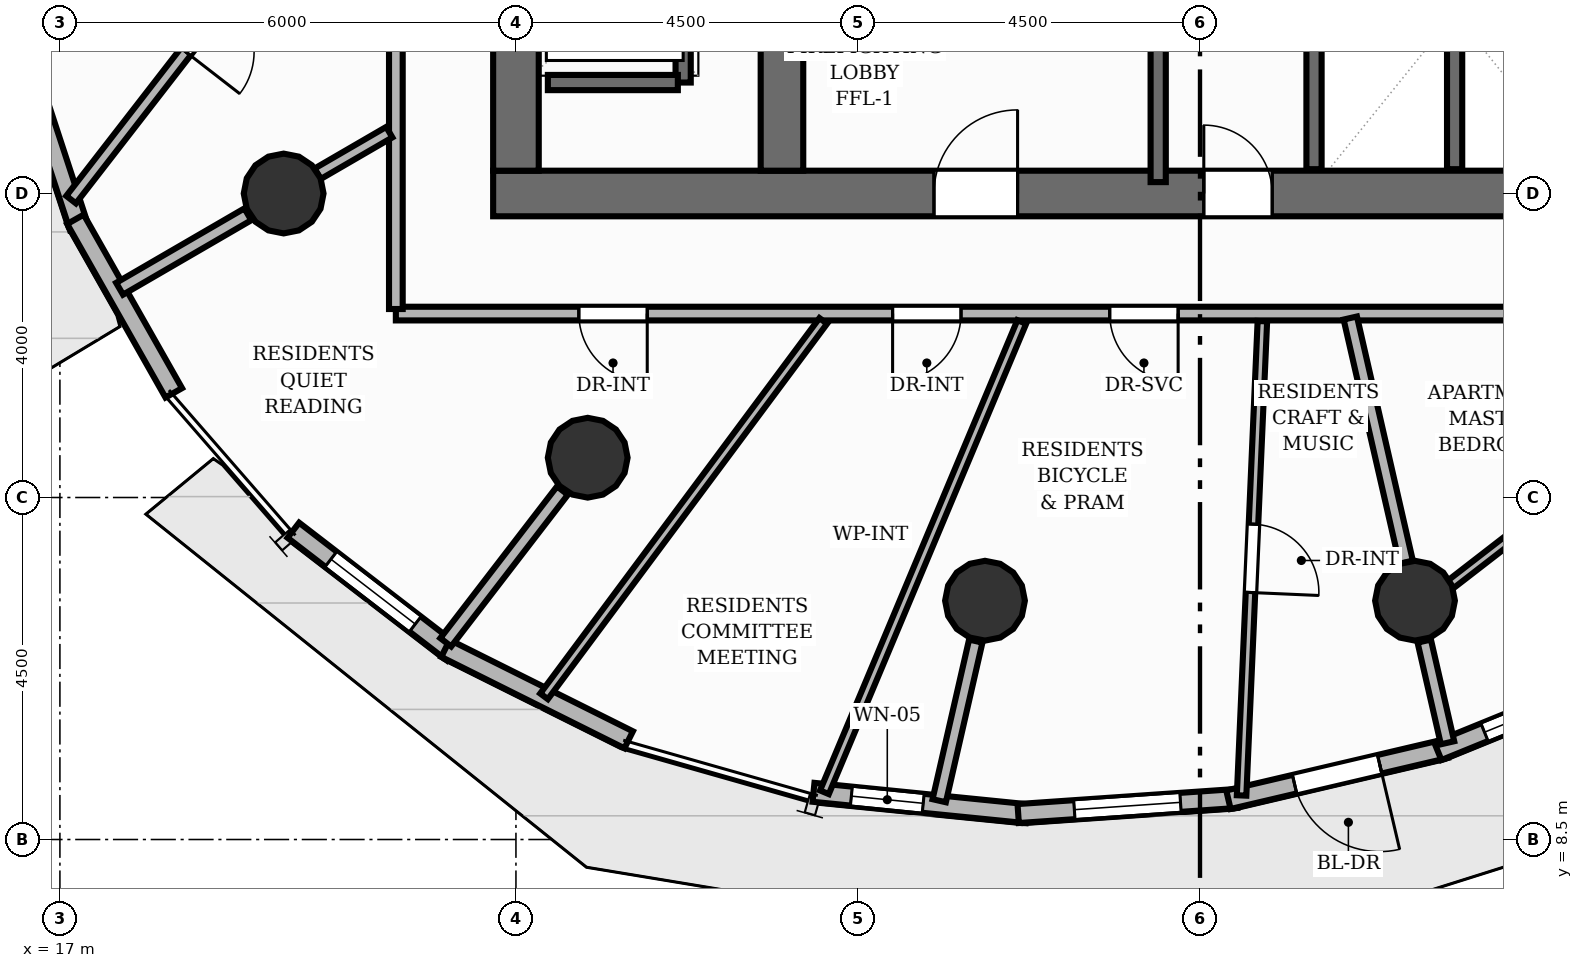
"""IFC4 building model, lengths in metres.
Left out: names, types, materials, properties, quantities, classifications, styles, units other than length and angle.
Written with IfcOpenShell. Run it as: python <this file> out.ifc"""

import sys

from ifc_helpers import new_model, si_unit, direction, frame, frame_2d, origin, origin_2d, place, context, subcontext, project, spatial, rectangle, circle, extrude, element, fill, save


model = new_model("IFC4")
c1 = context("Model", 3, precision=1e-05, world=origin(), true_north=direction((0.0, 1.0)))
c2 = subcontext(c1, "Body", "Model", "MODEL_VIEW")
j1 = project(units=[si_unit("LENGTHUNIT", "METRE"), si_unit("PLANEANGLEUNIT", "RADIAN")], contexts=[c1])
p1 = place(None, origin())
s1 = spatial("IfcSite", under=j1, at=p1, CompositionType="ELEMENT")
p2 = place(p1, origin())
s2 = spatial("IfcBuilding", under=s1, at=p2, CompositionType="ELEMENT")
p3 = place(p2, frame((0.0, 0.0, 142.56)))
s3 = spatial("IfcBuildingStorey", under=s2, at=p3, CompositionType="ELEMENT", Elevation=142.56)
p4 = place(p3, frame((22.7, 17.0, 0.0), z_axis=(0.0, 0.0, 1.0), x_axis=(1.0, 0.0, 0.0)))
e1 = element("IfcWall", 1, at=p4, inside=s3, PredefinedType="SHEAR", context=c2, shape_type="SweptSolid", body=[
    extrude(rectangle(XDim=15.1, YDim=0.6, at=frame_2d((7.55, 0.0))), origin(), (0.0, 0.0, 1.0), 3.2),
])
p5 = place(p4, frame((5.8, 0.0, 0.0)))
e2 = element("IfcOpeningElement", 2, at=p5, cuts=e1, PredefinedType="OPENING", context=c2, shape_type="SweptSolid", body=[
    extrude(rectangle(XDim=1.1, YDim=2.15, at=frame_2d((0.55, 1.075))), frame((0.0, 0.31, 0.0), z_axis=(0.0, -1.0, 0.0), x_axis=(1.0, 0.0, 0.0)), (0.0, 0.0, 1.0), 0.62),
])
p6 = place(p4, frame((9.35, 0.0, 0.0)))
e3 = element("IfcOpeningElement", 3, at=p6, cuts=e1, PredefinedType="OPENING", context=c2, shape_type="SweptSolid", body=[
    extrude(rectangle(XDim=0.9, YDim=2.1, at=frame_2d((0.45, 1.05))), frame((0.0, 0.31, 0.0), z_axis=(0.0, -1.0, 0.0), x_axis=(1.0, 0.0, 0.0)), (0.0, 0.0, 1.0), 0.62),
])
p7 = place(p3, frame((23.0, 17.3, 0.0), z_axis=(0.0, 0.0, 1.0), x_axis=(0.0, 1.0, 0.0)))
e4 = element("IfcWall", 4, at=p7, inside=s3, PredefinedType="SHEAR", context=c2, shape_type="SweptSolid", body=[
    extrude(rectangle(XDim=13.4, YDim=0.6, at=frame_2d((6.7, 0.0))), origin(), (0.0, 0.0, 1.0), 3.2),
])
p8 = place(p7, frame((1.675, 0.0, 0.0)))
e5 = element("IfcOpeningElement", 5, at=p8, cuts=e4, PredefinedType="OPENING", context=c2, shape_type="SweptSolid", body=[
    extrude(rectangle(XDim=1.05, YDim=2.15, at=frame_2d((0.525, 1.075))), frame((0.0, 0.31, 0.0), z_axis=(0.0, -1.0, 0.0), x_axis=(1.0, 0.0, 0.0)), (0.0, 0.0, 1.0), 0.62),
])
p9 = place(p7, frame((6.175, 0.0, 0.0)))
e6 = element("IfcOpeningElement", 6, at=p9, cuts=e4, PredefinedType="OPENING", context=c2, shape_type="SweptSolid", body=[
    extrude(rectangle(XDim=1.05, YDim=2.15, at=frame_2d((0.525, 1.075))), frame((0.0, 0.31, 0.0), z_axis=(0.0, -1.0, 0.0), x_axis=(1.0, 0.0, 0.0)), (0.0, 0.0, 1.0), 0.62),
])
p10 = place(p7, frame((10.675, 0.0, 0.0)))
e7 = element("IfcOpeningElement", 7, at=p10, cuts=e4, PredefinedType="OPENING", context=c2, shape_type="SweptSolid", body=[
    extrude(rectangle(XDim=1.05, YDim=2.15, at=frame_2d((0.525, 1.075))), frame((0.0, 0.31, 0.0), z_axis=(0.0, -1.0, 0.0), x_axis=(1.0, 0.0, 0.0)), (0.0, 0.0, 1.0), 0.62),
])
p11 = place(p3, frame((26.5, 17.3, 0.0), z_axis=(0.0, 0.0, 1.0), x_axis=(0.0, 1.0, 0.0)))
e8 = element("IfcWall", 8, at=p11, inside=s3, PredefinedType="SHEAR", context=c2, shape_type="SweptSolid", body=[
    extrude(rectangle(XDim=13.4, YDim=0.56, at=frame_2d((6.7, 0.0))), origin(), (0.0, 0.0, 1.0), 3.2),
])
for number, where, z_axis, x_axis in (
    (9, (19.944, 17.0, 0.0), (0.0, 0.0, 1.0), (1.0, 0.0, 0.0)),
    (10, (23.944, 13.523, 0.0), (0.0, 0.0, 1.0), (1.0, 0.0, 0.0)),
    (11, (29.171, 11.642, 0.0), (0.0, 0.0, 1.0), (1.0, 0.0, 0.0)),
    (12, (34.829, 11.642, 0.0), (0.0, 0.0, 1.0), (1.0, 0.0, 0.0)),
):
    element("IfcColumn", number, at=place(p3, frame(where, z_axis=z_axis, x_axis=x_axis)), inside=s3, PredefinedType="COLUMN", context=c2, shape_type="SweptSolid", body=[
        extrude(circle(Radius=0.525, at=origin_2d()), origin(), (0.0, 0.0, 1.0), 3.2),
    ])
p12 = place(p3, frame((17.251, 16.556, 0.0), z_axis=(0.0, 0.0, 1.0), x_axis=(-0.311522010952, 0.950238936633, 0.0)))
e13 = element("IfcWall", 13, at=p12, inside=s3, PredefinedType="SOLIDWALL", context=c2, shape_type="SweptSolid", body=[
    extrude(rectangle(XDim=2.648, YDim=0.25, at=frame_2d((1.324, 0.0))), origin(), (0.0, 0.0, 1.0), 2.96),
])
p13 = place(p3, frame((18.498, 14.377, 0.0), z_axis=(0.0, 0.0, 1.0), x_axis=(-0.492909281161, 0.870080709214, 0.0)))
e14 = element("IfcWall", 14, at=p13, inside=s3, PredefinedType="SOLIDWALL", context=c2, shape_type="SweptSolid", body=[
    extrude(rectangle(XDim=2.624, YDim=0.25, at=frame_2d((1.312, 0.0))), origin(), (0.0, 0.0, 1.0), 2.96),
])
p14 = place(p3, frame((22.169, 10.954, 0.0), z_axis=(0.0, 0.0, 1.0), x_axis=(-0.7923805969, 0.610027040103, 0.0)))
e15 = element("IfcWall", 15, at=p14, inside=s3, PredefinedType="SOLIDWALL", context=c2, shape_type="SweptSolid", body=[
    extrude(rectangle(XDim=2.648, YDim=0.25, at=frame_2d((1.324, 0.0))), origin(), (0.0, 0.0, 1.0), 2.96),
])
p15 = place(p14, frame((0.624, 0.0, 0.85)))
e16 = element("IfcOpeningElement", 16, at=p15, cuts=e15, PredefinedType="OPENING", context=c2, shape_type="SweptSolid", body=[
    extrude(rectangle(XDim=1.4, YDim=1.55, at=frame_2d((0.7, 0.775))), frame((0.0, 0.135, 0.0), z_axis=(0.0, -1.0, 0.0), x_axis=(1.0, 0.0, 0.0)), (0.0, 0.0, 1.0), 0.27),
])
p16 = place(p3, frame((24.483, 9.812, 0.0), z_axis=(0.0, 0.0, 1.0), x_axis=(-0.894843809708, 0.446379385979, 0.0)))
e17 = element("IfcWall", 17, at=p16, inside=s3, PredefinedType="SOLIDWALL", context=c2, shape_type="SweptSolid", body=[
    extrude(rectangle(XDim=2.693, YDim=0.25, at=frame_2d((1.347, 0.0))), origin(), (0.0, 0.0, 1.0), 2.96),
])
p17 = place(p3, frame((29.719, 8.84, 0.0), z_axis=(0.0, 0.0, 1.0), x_axis=(-0.995013999105, 0.099735357744, 0.0)))
e18 = element("IfcWall", 18, at=p17, inside=s3, PredefinedType="SOLIDWALL", context=c2, shape_type="SweptSolid", body=[
    extrude(rectangle(XDim=2.818, YDim=0.25, at=frame_2d((1.409, 0.0))), origin(), (0.0, 0.0, 1.0), 2.96),
])
p18 = place(p17, frame((1.367, 0.0, 0.85)))
e19 = element("IfcOpeningElement", 19, at=p18, cuts=e18, PredefinedType="OPENING", context=c2, shape_type="SweptSolid", body=[
    extrude(rectangle(XDim=0.95, YDim=1.45, at=frame_2d((0.475, 0.725))), frame((0.0, 0.135, 0.0), z_axis=(0.0, -1.0, 0.0), x_axis=(1.0, 0.0, 0.0)), (0.0, 0.0, 1.0), 0.27),
])
p19 = place(p3, frame((32.483, 9.04, 0.0), z_axis=(0.0, 0.0, 1.0), x_axis=(-0.997630729469, -0.068796276206, 0.0)))
e20 = element("IfcWall", 20, at=p19, inside=s3, PredefinedType="SOLIDWALL", context=c2, shape_type="SweptSolid", body=[
    extrude(rectangle(XDim=2.882, YDim=0.25, at=frame_2d((1.441, 0.0))), origin(), (0.0, 0.0, 1.0), 2.96),
])
p20 = place(p19, frame((0.741, 0.0, 0.85)))
e21 = element("IfcOpeningElement", 21, at=p20, cuts=e20, PredefinedType="OPENING", context=c2, shape_type="SweptSolid", body=[
    extrude(rectangle(XDim=1.4, YDim=1.55, at=frame_2d((0.7, 0.775))), frame((0.0, 0.135, 0.0), z_axis=(0.0, -1.0, 0.0), x_axis=(1.0, 0.0, 0.0)), (0.0, 0.0, 1.0), 0.27),
])
p21 = place(p3, frame((35.233, 9.695, 0.0), z_axis=(0.0, 0.0, 1.0), x_axis=(-0.973538048261, -0.228524984602, 0.0)))
e22 = element("IfcWall", 22, at=p21, inside=s3, PredefinedType="SOLIDWALL", context=c2, shape_type="SweptSolid", body=[
    extrude(rectangle(XDim=2.937, YDim=0.25, at=frame_2d((1.468, 0.0))), origin(), (0.0, 0.0, 1.0), 2.96),
])
p22 = place(p21, frame((0.893, 0.0, 0.0)))
e23 = element("IfcOpeningElement", 23, at=p22, cuts=e22, PredefinedType="OPENING", context=c2, shape_type="SweptSolid", body=[
    extrude(rectangle(XDim=1.15, YDim=2.2, at=frame_2d((0.575, 1.1))), frame((0.0, 0.135, 0.0), z_axis=(0.0, -1.0, 0.0), x_axis=(1.0, 0.0, 0.0)), (0.0, 0.0, 1.0), 0.27),
])
p23 = place(p3, frame((37.886, 10.785, 0.0), z_axis=(0.0, 0.0, 1.0), x_axis=(-0.926076439021, -0.377335963154, 0.0)))
e24 = element("IfcWall", 24, at=p23, inside=s3, PredefinedType="SOLIDWALL", context=c2, shape_type="SweptSolid", body=[
    extrude(rectangle(XDim=2.977, YDim=0.25, at=frame_2d((1.488, 0.0))), origin(), (0.0, 0.0, 1.0), 2.96),
])
p24 = place(p23, frame((0.664, 0.0, 0.85)))
e25 = element("IfcOpeningElement", 25, at=p24, cuts=e24, PredefinedType="OPENING", context=c2, shape_type="SweptSolid", body=[
    extrude(rectangle(XDim=1.65, YDim=1.55, at=frame_2d((0.825, 0.775))), frame((0.0, 0.135, 0.0), z_axis=(0.0, -1.0, 0.0), x_axis=(1.0, 0.0, 0.0)), (0.0, 0.0, 1.0), 0.27),
])
p25 = place(p3, frame((31.45, 17.15, 0.0), z_axis=(0.0, 0.0, 1.0), x_axis=(0.0, 1.0, 0.0)))
e26 = element("IfcWall", 26, at=p25, inside=s3, PredefinedType="SHEAR", context=c2, shape_type="SweptSolid", body=[
    extrude(rectangle(XDim=3.5, YDim=0.2, at=frame_2d((1.75, 0.0))), origin(), (0.0, 0.0, 1.0), 3.2),
])
p26 = place(p3, frame((25.2, 18.46, 0.0), z_axis=(0.0, 0.0, 1.0), x_axis=(0.0, 1.0, 0.0)))
e27 = element("IfcWall", 27, at=p26, inside=s3, PredefinedType="SHEAR", context=c2, shape_type="SweptSolid", body=[
    extrude(rectangle(XDim=11.08, YDim=0.2, at=frame_2d((5.54, 0.0))), origin(), (0.0, 0.0, 1.0), 3.2),
])
p27 = place(p3, frame((23.42, 18.46, 0.0), z_axis=(0.0, 0.0, 1.0), x_axis=(1.0, 0.0, 0.0)))
e28 = element("IfcWall", 28, at=p27, inside=s3, PredefinedType="SHEAR", context=c2, shape_type="SweptSolid", body=[
    extrude(rectangle(XDim=1.71, YDim=0.2, at=frame_2d((0.855, 0.0))), origin(), (0.0, 0.0, 1.0), 3.2),
])
for number, where, z_axis, x_axis in (
    (29, (33.5, 17.32, 0.0), (0.0, 0.0, 1.0), (0.0, 1.0, 0.0)),
    (30, (35.35, 17.32, 0.0), (0.0, 0.0, 1.0), (0.0, 1.0, 0.0)),
):
    element("IfcWall", number, at=place(p3, frame(where, z_axis=z_axis, x_axis=x_axis)), inside=s3, PredefinedType="SHEAR", context=c2, shape_type="SweptSolid", body=[
        extrude(rectangle(XDim=1.86, YDim=0.2, at=frame_2d((0.93, 0.0))), origin(), (0.0, 0.0, 1.0), 3.2),
    ])
p28 = place(p3, frame((19.472, 16.726, 0.0), z_axis=(0.0, 0.0, 1.0), x_axis=(-0.864802971131, -0.502111363268, 0.0)))
e31 = element("IfcWall", 31, at=p28, inside=s3, PredefinedType="PARTITIONING", context=c2, shape_type="SweptSolid", body=[
    extrude(rectangle(XDim=1.951, YDim=0.18, at=frame_2d((0.975, 0.0))), origin(), (0.0, 0.0, 1.0), 2.336),
])
p29 = place(p3, frame((23.612, 13.092, 0.0), z_axis=(0.0, 0.0, 1.0), x_axis=(-0.609556175004, -0.792742877303, 0.0)))
e32 = element("IfcWall", 32, at=p29, inside=s3, PredefinedType="PARTITIONING", context=c2, shape_type="SweptSolid", body=[
    extrude(rectangle(XDim=2.519, YDim=0.18, at=frame_2d((1.259, 0.0))), origin(), (0.0, 0.0, 1.0), 2.336),
])
p30 = place(p3, frame((29.05, 11.111, 0.0), z_axis=(0.0, 0.0, 1.0), x_axis=(-0.223080127706, -0.974800111111, 0.0)))
e33 = element("IfcWall", 33, at=p30, inside=s3, PredefinedType="PARTITIONING", context=c2, shape_type="SweptSolid", body=[
    extrude(rectangle(XDim=2.155, YDim=0.18, at=frame_2d((1.077, 0.0))), origin(), (0.0, 0.0, 1.0), 2.336),
])
p31 = place(p3, frame((34.95, 11.111, 0.0), z_axis=(0.0, 0.0, 1.0), x_axis=(0.223027623572, -0.974812125039, 0.0)))
e34 = element("IfcWall", 34, at=p31, inside=s3, PredefinedType="PARTITIONING", context=c2, shape_type="SweptSolid", body=[
    extrude(rectangle(XDim=1.373, YDim=0.18, at=frame_2d((0.687, 0.0))), origin(), (0.0, 0.0, 1.0), 2.336),
])
p32 = place(p3, frame((39.08, 15.42, 0.0), z_axis=(0.0, 0.0, 1.0), x_axis=(-1.0, 0.0, 0.0)))
e35 = element("IfcWall", 35, at=p32, inside=s3, PredefinedType="PARTITIONING", context=c2, shape_type="SweptSolid", body=[
    extrude(rectangle(XDim=17.66, YDim=0.18, at=frame_2d((8.83, 0.0))), origin(), (0.0, 0.0, 1.0), 2.955),
])
p33 = place(p32, frame((7.368, 0.0, 0.0)))
e36 = element("IfcOpeningElement", 36, at=p33, cuts=e35, PredefinedType="OPENING", context=c2, shape_type="SweptSolid", body=[
    extrude(rectangle(XDim=0.9, YDim=2.1, at=frame_2d((0.45, 1.05))), frame((0.0, 0.1, 0.0), z_axis=(0.0, -1.0, 0.0), x_axis=(1.0, 0.0, 0.0)), (0.0, 0.0, 1.0), 0.2),
])
p34 = place(p32, frame((10.224, 0.0, 0.0)))
e37 = element("IfcOpeningElement", 37, at=p34, cuts=e35, PredefinedType="OPENING", context=c2, shape_type="SweptSolid", body=[
    extrude(rectangle(XDim=0.9, YDim=2.1, at=frame_2d((0.45, 1.05))), frame((0.0, 0.1, 0.0), z_axis=(0.0, -1.0, 0.0), x_axis=(1.0, 0.0, 0.0)), (0.0, 0.0, 1.0), 0.2),
])
p35 = place(p32, frame((14.353, 0.0, 0.0)))
e38 = element("IfcOpeningElement", 38, at=p35, cuts=e35, PredefinedType="OPENING", context=c2, shape_type="SweptSolid", body=[
    extrude(rectangle(XDim=0.9, YDim=2.1, at=frame_2d((0.45, 1.05))), frame((0.0, 0.1, 0.0), z_axis=(0.0, -1.0, 0.0), x_axis=(1.0, 0.0, 0.0)), (0.0, 0.0, 1.0), 0.2),
])
p36 = place(p3, frame((21.42, 15.48, 0.0), z_axis=(0.0, 0.0, 1.0), x_axis=(0.0, 1.0, 0.0)))
e39 = element("IfcWall", 39, at=p36, inside=s3, PredefinedType="PARTITIONING", context=c2, shape_type="SweptSolid", body=[
    extrude(rectangle(XDim=6.12, YDim=0.18, at=frame_2d((3.06, 0.0))), origin(), (0.0, 0.0, 1.0), 2.955),
])
p37 = place(p3, frame((27.059, 9.122, 0.0), z_axis=(0.0, 0.0, 1.0), x_axis=(0.386926287161, 0.922110648623, 0.0)))
e40 = element("IfcWall", 40, at=p37, inside=s3, PredefinedType="PARTITIONING", context=c2, shape_type="SweptSolid", body=[
    extrude(rectangle(XDim=6.71, YDim=0.125, at=frame_2d((3.355, 0.0))), origin(), (0.0, 0.0, 1.0), 2.955),
])
p38 = place(p3, frame((32.821, 15.32, 0.0), z_axis=(0.0, 0.0, 1.0), x_axis=(-0.043813760095, -0.999039716141, 0.0)))
e41 = element("IfcWall", 41, at=p38, inside=s3, PredefinedType="PARTITIONING", context=c2, shape_type="SweptSolid", body=[
    extrude(rectangle(XDim=6.247, YDim=0.125, at=frame_2d((3.123, 0.0))), origin(), (0.0, 0.0, 1.0), 2.692),
])
p39 = place(p38, frame((2.673, 0.0, 0.0)))
e42 = element("IfcOpeningElement", 42, at=p39, cuts=e41, PredefinedType="OPENING", context=c2, shape_type="SweptSolid", body=[
    extrude(rectangle(XDim=0.9, YDim=2.1, at=frame_2d((0.45, 1.05))), frame((0.0, 0.073, 0.0), z_axis=(0.0, -1.0, 0.0), x_axis=(1.0, 0.0, 0.0)), (0.0, 0.0, 1.0), 0.145),
])
p40 = place(p3, frame((23.37, 10.384, 0.0), z_axis=(0.0, 0.0, 1.0), x_axis=(0.596726995384, 0.802444323913, 0.0)))
e43 = element("IfcWall", 43, at=p40, inside=s3, PredefinedType="PARTITIONING", context=c2, shape_type="SweptSolid", body=[
    extrude(rectangle(XDim=6.156, YDim=0.125, at=frame_2d((3.078, 0.0))), origin(), (0.0, 0.0, 1.0), 2.692),
])
p41 = place(p3, frame((20.391, 17.26, 0.0), z_axis=(0.0, 0.0, 1.0), x_axis=(0.864719901707, 0.50225440923, 0.0)))
e44 = element("IfcWall", 44, at=p41, inside=s3, PredefinedType="PLUMBINGWALL", context=c2, shape_type="SweptSolid", body=[
    extrude(rectangle(XDim=1.09, YDim=0.16, at=frame_2d((0.545, 0.0))), origin(), (0.0, 0.0, 1.0), 2.336),
])
p42 = place(p3, frame((33.977, 15.362, 0.0), z_axis=(0.0, 0.0, 1.0), x_axis=(0.22319287001, -0.974774303506, 0.0)))
e45 = element("IfcWall", 45, at=p42, inside=s3, PredefinedType="PARTITIONING", context=c2, shape_type="SweptSolid", body=[
    extrude(rectangle(XDim=3.296, YDim=0.18, at=frame_2d((1.648, 0.0))), origin(), (0.0, 0.0, 1.0), 2.336),
])
p43 = place(p3, frame((43.184, 17.96, 0.0), z_axis=(0.0, 0.0, 1.0), x_axis=(-0.790862802872, -0.611993486104, 0.0)))
e46 = element("IfcWall", 46, at=p43, inside=s3, PredefinedType="PARTITIONING", context=c2, shape_type="SweptSolid", body=[
    extrude(rectangle(XDim=9.975, YDim=0.125, at=frame_2d((4.987, 0.0))), origin(), (0.0, 0.0, 1.0), 2.411),
])
p44 = place(p43, frame((3.417, 0.0, 0.0)))
e47 = element("IfcOpeningElement", 47, at=p44, cuts=e46, PredefinedType="OPENING", context=c2, shape_type="SweptSolid", body=[
    extrude(rectangle(XDim=0.9, YDim=2.1, at=frame_2d((0.45, 1.05))), frame((0.0, 0.073, 0.0), z_axis=(0.0, -1.0, 0.0), x_axis=(1.0, 0.0, 0.0)), (0.0, 0.0, 1.0), 0.145),
])
p45 = place(p3, frame((20.714, 21.521, 0.0), z_axis=(0.0, 0.0, 1.0), x_axis=(-0.612572320399, -0.790414544578, 0.0)))
e48 = element("IfcWall", 48, at=p45, inside=s3, PredefinedType="PLUMBINGWALL", context=c2, shape_type="SweptSolid", body=[
    extrude(rectangle(XDim=5.822, YDim=0.16, at=frame_2d((2.911, 0.0))), origin(), (0.0, 0.0, 1.0), 2.955),
])
p46 = place(p45, frame((2.461, 0.0, 0.0)))
e49 = element("IfcOpeningElement", 49, at=p46, cuts=e48, PredefinedType="OPENING", context=c2, shape_type="SweptSolid", body=[
    extrude(rectangle(XDim=0.9, YDim=2.1, at=frame_2d((0.45, 1.05))), frame((0.0, 0.09, 0.0), z_axis=(0.0, -1.0, 0.0), x_axis=(1.0, 0.0, 0.0)), (0.0, 0.0, 1.0), 0.18),
])
p47 = place(p22, origin())
e50 = element("IfcDoor", 50, at=p47, inside=s3, OperationType="SINGLE_SWING_LEFT", PredefinedType="DOOR", context=c2, shape_type="SweptSolid", body=[
    extrude(rectangle(XDim=1.15, YDim=2.2, at=frame_2d((0.575, 1.1))), frame((0.0, 0.025, 0.0), z_axis=(0.0, -1.0, 0.0), x_axis=(1.0, 0.0, 0.0)), (0.0, 0.0, 1.0), 0.05),
])
fill(e23, e50)
p48 = place(p15, origin())
e51 = element("IfcWindow", 51, at=p48, inside=s3, PartitioningType="SINGLE_PANEL", PredefinedType="WINDOW", context=c2, shape_type="SweptSolid", body=[
    extrude(rectangle(XDim=1.4, YDim=1.55, at=frame_2d((0.7, 0.775))), frame((0.0, 0.03, 0.0), z_axis=(0.0, -1.0, 0.0), x_axis=(1.0, 0.0, 0.0)), (0.0, 0.0, 1.0), 0.06),
])
fill(e16, e51)
p49 = place(p18, origin())
e52 = element("IfcWindow", 52, at=p49, inside=s3, PartitioningType="SINGLE_PANEL", PredefinedType="WINDOW", context=c2, shape_type="SweptSolid", body=[
    extrude(rectangle(XDim=0.95, YDim=1.45, at=frame_2d((0.475, 0.725))), frame((0.0, 0.03, 0.0), z_axis=(0.0, -1.0, 0.0), x_axis=(1.0, 0.0, 0.0)), (0.0, 0.0, 1.0), 0.06),
])
fill(e19, e52)
p50 = place(p20, origin())
e53 = element("IfcWindow", 53, at=p50, inside=s3, PartitioningType="SINGLE_PANEL", PredefinedType="WINDOW", context=c2, shape_type="SweptSolid", body=[
    extrude(rectangle(XDim=1.4, YDim=1.55, at=frame_2d((0.7, 0.775))), frame((0.0, 0.03, 0.0), z_axis=(0.0, -1.0, 0.0), x_axis=(1.0, 0.0, 0.0)), (0.0, 0.0, 1.0), 0.06),
])
fill(e21, e53)
p51 = place(p24, origin())
e54 = element("IfcWindow", 54, at=p51, inside=s3, PartitioningType="SINGLE_PANEL", PredefinedType="WINDOW", context=c2, shape_type="SweptSolid", body=[
    extrude(rectangle(XDim=1.65, YDim=1.55, at=frame_2d((0.825, 0.775))), frame((0.0, 0.03, 0.0), z_axis=(0.0, -1.0, 0.0), x_axis=(1.0, 0.0, 0.0)), (0.0, 0.0, 1.0), 0.06),
])
fill(e25, e54)
p52 = place(p5, origin())
e55 = element("IfcDoor", 55, at=p52, inside=s3, OperationType="SINGLE_SWING_RIGHT", PredefinedType="DOOR", context=c2, shape_type="SweptSolid", body=[
    extrude(rectangle(XDim=1.1, YDim=2.15, at=frame_2d((0.55, 1.075))), frame((0.0, 0.025, 0.0), z_axis=(0.0, -1.0, 0.0), x_axis=(1.0, 0.0, 0.0)), (0.0, 0.0, 1.0), 0.05),
])
fill(e2, e55)
p53 = place(p6, origin())
e56 = element("IfcDoor", 56, at=p53, inside=s3, OperationType="SINGLE_SWING_LEFT", PredefinedType="DOOR", context=c2, shape_type="SweptSolid", body=[
    extrude(rectangle(XDim=0.9, YDim=2.1, at=frame_2d((0.45, 1.05))), frame((0.0, 0.025, 0.0), z_axis=(0.0, -1.0, 0.0), x_axis=(1.0, 0.0, 0.0)), (0.0, 0.0, 1.0), 0.05),
])
fill(e3, e56)
p54 = place(p33, origin())
e57 = element("IfcDoor", 57, at=p54, inside=s3, OperationType="SINGLE_SWING_LEFT", PredefinedType="DOOR", context=c2, shape_type="SweptSolid", body=[
    extrude(rectangle(XDim=0.9, YDim=2.1, at=frame_2d((0.45, 1.05))), frame((0.0, 0.025, 0.0), z_axis=(0.0, -1.0, 0.0), x_axis=(1.0, 0.0, 0.0)), (0.0, 0.0, 1.0), 0.05),
])
fill(e36, e57)
p55 = place(p34, origin())
e58 = element("IfcDoor", 58, at=p55, inside=s3, OperationType="SINGLE_SWING_RIGHT", PredefinedType="DOOR", context=c2, shape_type="SweptSolid", body=[
    extrude(rectangle(XDim=0.9, YDim=2.1, at=frame_2d((0.45, 1.05))), frame((0.0, 0.025, 0.0), z_axis=(0.0, -1.0, 0.0), x_axis=(1.0, 0.0, 0.0)), (0.0, 0.0, 1.0), 0.05),
])
fill(e37, e58)
p56 = place(p35, origin())
e59 = element("IfcDoor", 59, at=p56, inside=s3, OperationType="SINGLE_SWING_LEFT", PredefinedType="DOOR", context=c2, shape_type="SweptSolid", body=[
    extrude(rectangle(XDim=0.9, YDim=2.1, at=frame_2d((0.45, 1.05))), frame((0.0, 0.025, 0.0), z_axis=(0.0, -1.0, 0.0), x_axis=(1.0, 0.0, 0.0)), (0.0, 0.0, 1.0), 0.05),
])
fill(e38, e59)
p57 = place(p39, origin())
e60 = element("IfcDoor", 60, at=p57, inside=s3, OperationType="SINGLE_SWING_RIGHT", PredefinedType="DOOR", context=c2, shape_type="SweptSolid", body=[
    extrude(rectangle(XDim=0.9, YDim=2.1, at=frame_2d((0.45, 1.05))), frame((0.0, 0.025, 0.0), z_axis=(0.0, -1.0, 0.0), x_axis=(1.0, 0.0, 0.0)), (0.0, 0.0, 1.0), 0.05),
])
fill(e42, e60)
p58 = place(p46, origin())
e61 = element("IfcDoor", 61, at=p58, inside=s3, OperationType="SINGLE_SWING_RIGHT", PredefinedType="DOOR", context=c2, shape_type="SweptSolid", body=[
    extrude(rectangle(XDim=0.9, YDim=2.1, at=frame_2d((0.45, 1.05))), frame((0.0, 0.025, 0.0), z_axis=(0.0, -1.0, 0.0), x_axis=(1.0, 0.0, 0.0)), (0.0, 0.0, 1.0), 0.05),
])
fill(e49, e61)
save(model, sys.argv[1])
